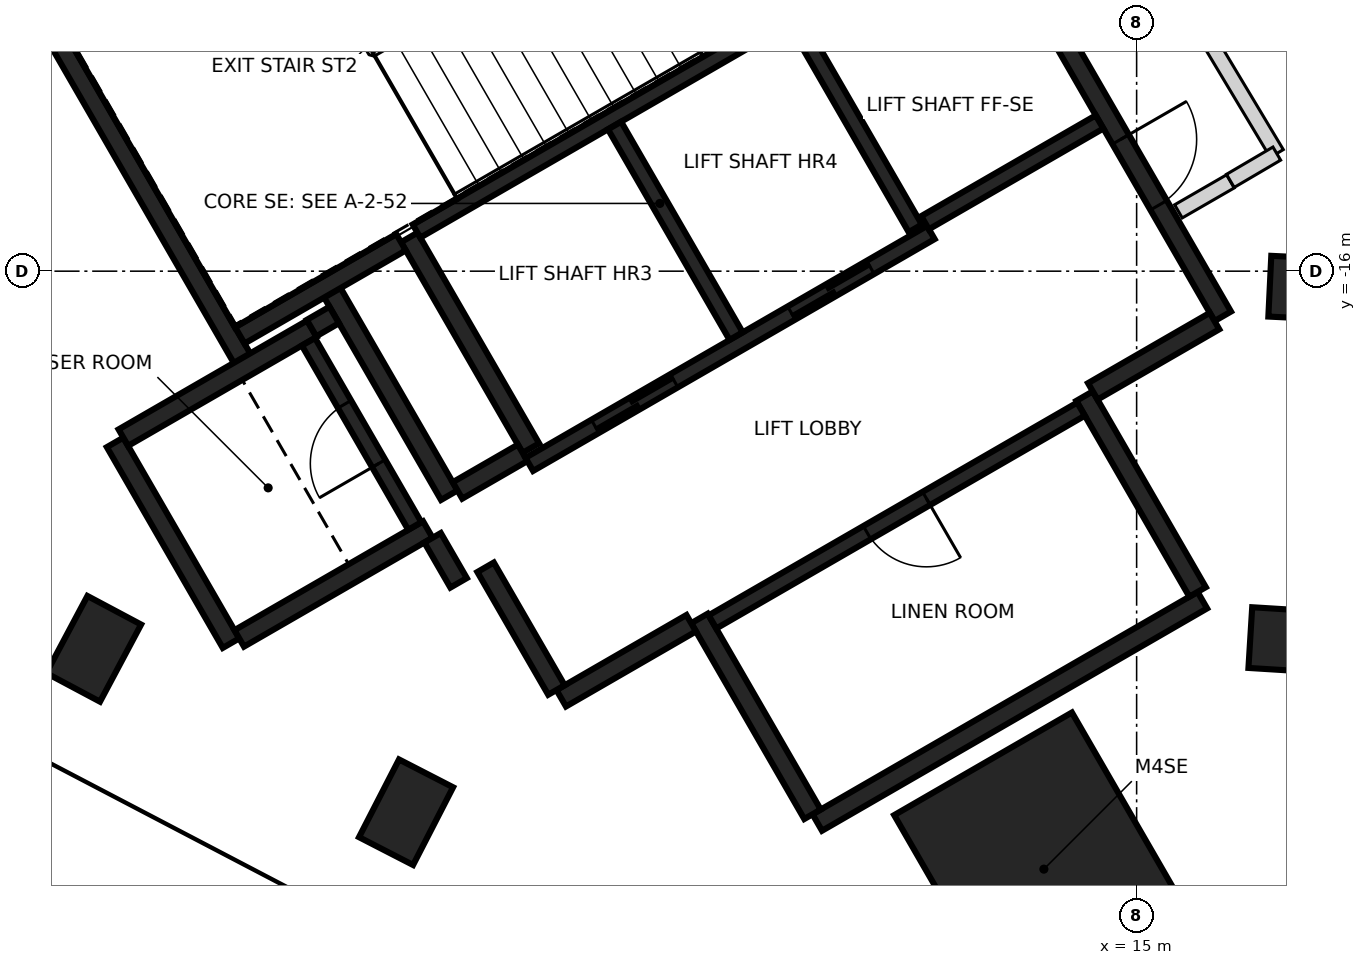
"""IFC4 building model, lengths in metres.
Left out: names, types, materials, properties, quantities, classifications, styles, units other than length and angle.
Written with IfcOpenShell. Run it as: python <this file> out.ifc"""

import sys

from ifc_helpers import new_model, si_unit, direction, frame, frame_2d, origin, origin_2d, place, context, subcontext, project, spatial, rectangle, extrude, element, fill, save


model = new_model("IFC4")
c1 = context("Model", 3, precision=1e-05, world=origin(), true_north=direction((0.0, 1.0)))
c2 = subcontext(c1, "Body", "Model", "MODEL_VIEW")
j1 = project(units=[si_unit("LENGTHUNIT", "METRE"), si_unit("PLANEANGLEUNIT", "RADIAN")], contexts=[c1])
p1 = place(None, origin())
s1 = spatial("IfcSite", under=j1, at=p1, CompositionType="ELEMENT")
p2 = place(p1, origin())
s2 = spatial("IfcBuilding", under=s1, at=p2, CompositionType="ELEMENT")
p3 = place(p2, frame((0.0, 0.0, 179.2)))
s3 = spatial("IfcBuildingStorey", under=s2, at=p3, CompositionType="ELEMENT", Elevation=179.2)
for number, where, z_axis, x_axis in (
    (1, (17.07, -20.856, -0.35), (0.0, 0.0, 1.0), (-0.998, 0.062, 0.0)),
    (2, (17.326, -16.226, -0.35), (0.0, 0.0, 1.0), (-0.999, 0.048, 0.0)),
    (3, (1.279, -20.968, -0.35), (0.0, 0.0, 1.0), (0.47, 0.883, 0.0)),
    (4, (5.388, -23.118, -0.35), (0.0, 0.0, 1.0), (0.458, 0.889, 0.0)),
):
    element("IfcColumn", number, at=place(p3, frame(where, z_axis=z_axis, x_axis=x_axis)), inside=s3, PredefinedType="COLUMN", context=c2, shape_type="SweptSolid", body=[
        extrude(rectangle(XDim=1.15, YDim=0.8, at=origin_2d()), origin(), (0.0, 0.0, 1.0), 3.6),
    ])
p4 = place(p3, frame((13.78, -23.867, -0.35), z_axis=(0.0, 0.0, 1.0), x_axis=(-0.5, 0.866025403784, 0.0)))
e5 = element("IfcColumn", 5, at=p4, inside=s3, PredefinedType="COLUMN", context=c2, shape_type="SweptSolid", body=[
    extrude(rectangle(XDim=3.2, YDim=2.7, at=origin_2d()), origin(), (0.0, 0.0, 1.0), 3.6),
])
p5 = place(p3, frame((13.008, -11.181, 0.0), z_axis=(0.0, 0.0, 1.0), x_axis=(0.500004234368, -0.866022959057, 0.0)))
e6 = element("IfcWall", 6, at=p5, inside=s3, PredefinedType="SHEAR", context=c2, shape_type="SweptSolid", body=[
    extrude(rectangle(XDim=6.25, YDim=0.25, at=frame_2d((3.125, 0.0))), origin(), (0.0, 0.0, 1.0), 3.25),
])
p6 = place(p5, frame((3.563, 0.0, 0.0)))
e7 = element("IfcOpeningElement", 7, at=p6, cuts=e6, PredefinedType="OPENING", context=c2, shape_type="SweptSolid", body=[
    extrude(rectangle(XDim=1.0, YDim=2.1, at=frame_2d((0.5, 1.05))), frame((0.0, 0.135, 0.0), z_axis=(0.0, -1.0, 0.0), x_axis=(1.0, 0.0, 0.0)), (0.0, 0.0, 1.0), 0.27),
])
p7 = place(p3, frame((15.865, -20.328, 0.0), z_axis=(0.0, 0.0, 1.0), x_axis=(-0.86602852612, -0.499994591916, 0.0)))
e8 = element("IfcWall", 8, at=p7, inside=s3, PredefinedType="SHEAR", context=c2, shape_type="SweptSolid", body=[
    extrude(rectangle(XDim=5.85, YDim=0.25, at=frame_2d((2.925, 0.0))), origin(), (0.0, 0.0, 1.0), 3.25),
])
p8 = place(p3, frame((3.235, -17.153, 0.0), z_axis=(0.0, 0.0, 1.0), x_axis=(-0.500008851346, 0.866020293397, 0.0)))
e9 = element("IfcWall", 9, at=p8, inside=s3, PredefinedType="SHEAR", context=c2, shape_type="SweptSolid", body=[
    extrude(rectangle(XDim=5.51, YDim=0.25, at=frame_2d((2.755, 0.0))), origin(), (0.0, 0.0, 1.0), 3.25),
])
p9 = place(p3, frame((7.031, -18.327, 0.0), z_axis=(0.0, 0.0, 1.0), x_axis=(-0.499971222258, 0.866042017984, 0.0)))
e10 = element("IfcWall", 10, at=p9, inside=s3, PredefinedType="SHEAR", context=c2, shape_type="SweptSolid", body=[
    extrude(rectangle(XDim=3.2, YDim=0.25, at=frame_2d((1.6, 0.0))), origin(), (0.0, 0.0, 1.0), 3.25),
])
for number, where, z_axis, x_axis in (
    (11, (14.315, -17.644, 0.0), (0.0, 0.0, 1.0), (0.5, -0.866, 0.0)),
    (12, (10.736, -23.145, 0.0), (0.0, 0.0, 1.0), (-0.5, 0.866, 0.0)),
):
    element("IfcWall", number, at=place(p3, frame(where, z_axis=z_axis, x_axis=x_axis)), inside=s3, PredefinedType="SHEAR", context=c2, shape_type="SweptSolid", body=[
        extrude(rectangle(XDim=2.974, YDim=0.25, at=frame_2d((1.487, 0.0))), origin(), (0.0, 0.0, 1.0), 3.25),
    ])
p10 = place(p3, frame((3.085, -20.894, 0.0), z_axis=(0.0, 0.0, 1.0), x_axis=(-0.499978833458, 0.866037623948, 0.0)))
e13 = element("IfcWall", 13, at=p10, inside=s3, PredefinedType="SHEAR", context=c2, shape_type="SweptSolid", body=[
    extrude(rectangle(XDim=3.05, YDim=0.25, at=frame_2d((1.525, 0.0))), origin(), (0.0, 0.0, 1.0), 3.25),
])
p11 = place(p3, frame((1.669, -18.19, 0.0), z_axis=(0.0, 0.0, 1.0), x_axis=(0.866042235819, 0.499970844928, 0.0)))
e14 = element("IfcWall", 14, at=p11, inside=s3, PredefinedType="SHEAR", context=c2, shape_type="SweptSolid", body=[
    extrude(rectangle(XDim=2.865, YDim=0.25, at=frame_2d((1.432, 0.0))), origin(), (0.0, 0.0, 1.0), 3.25),
])
p12 = place(p3, frame((5.675, -19.399, 0.0), z_axis=(0.0, 0.0, 1.0), x_axis=(-0.866026637627, -0.499997862916, 0.0)))
e15 = element("IfcWall", 15, at=p12, inside=s3, PredefinedType="SHEAR", context=c2, shape_type="SweptSolid", body=[
    extrude(rectangle(XDim=2.865, YDim=0.25, at=frame_2d((1.432, 0.0))), origin(), (0.0, 0.0, 1.0), 3.25),
])
p13 = place(p3, frame((4.414, -16.276, 0.0), z_axis=(0.0, 0.0, 1.0), x_axis=(0.500003324108, -0.866023484601, 0.0)))
e16 = element("IfcWall", 16, at=p13, inside=s3, PredefinedType="SHEAR", context=c2, shape_type="SweptSolid", body=[
    extrude(rectangle(XDim=3.085, YDim=0.25, at=frame_2d((1.542, 0.0))), origin(), (0.0, 0.0, 1.0), 3.25),
])
p14 = place(p3, frame((5.322, -15.619, 0.0), z_axis=(0.0, 0.0, 1.0), x_axis=(-0.866026229868, -0.499998569178, 0.0)))
e17 = element("IfcWall", 17, at=p14, inside=s3, PredefinedType="SHEAR", context=c2, shape_type="SweptSolid", body=[
    extrude(rectangle(XDim=2.449, YDim=0.25, at=frame_2d((1.225, 0.0))), origin(), (0.0, 0.0, 1.0), 3.25),
])
p15 = place(p3, frame((9.14, -20.631, 0.0), z_axis=(0.0, 0.0, 1.0), x_axis=(-0.866043531843, -0.499968599967, 0.0)))
e18 = element("IfcWall", 18, at=p15, inside=s3, PredefinedType="SHEAR", context=c2, shape_type="SweptSolid", body=[
    extrude(rectangle(XDim=1.975, YDim=0.25, at=frame_2d((0.987, 0.0))), origin(), (0.0, 0.0, 1.0), 3.25),
])
p16 = place(p3, frame((16.025, -16.656, 0.0), z_axis=(0.0, 0.0, 1.0), x_axis=(-0.866016279763, -0.500015802937, 0.0)))
e19 = element("IfcWall", 19, at=p16, inside=s3, PredefinedType="SHEAR", context=c2, shape_type="SweptSolid", body=[
    extrude(rectangle(XDim=1.849, YDim=0.25, at=frame_2d((0.925, 0.0))), origin(), (0.0, 0.0, 1.0), 3.25),
])
p17 = place(p3, frame((7.367, -21.51, 0.0), z_axis=(0.0, 0.0, 1.0), x_axis=(-0.499983108224, 0.866035156036, 0.0)))
e20 = element("IfcWall", 20, at=p17, inside=s3, PredefinedType="SHEAR", context=c2, shape_type="SweptSolid", body=[
    extrude(rectangle(XDim=1.865, YDim=0.25, at=frame_2d((0.932, 0.0))), origin(), (0.0, 0.0, 1.0), 3.25),
])
p18 = place(p3, frame((6.065, -18.885, 0.0), z_axis=(0.0, 0.0, 1.0), x_axis=(0.866017078145, 0.500014420154, 0.0)))
e21 = element("IfcWall", 21, at=p18, inside=s3, PredefinedType="SHEAR", context=c2, shape_type="SweptSolid", body=[
    extrude(rectangle(XDim=0.989, YDim=0.25, at=frame_2d((0.495, 0.0))), origin(), (0.0, 0.0, 1.0), 3.25),
])
p19 = place(p3, frame((6.08, -20.1, 0.0), z_axis=(0.0, 0.0, 1.0), x_axis=(-0.500051773299, 0.865995510393, 0.0)))
e22 = element("IfcWall", 22, at=p19, inside=s3, PredefinedType="SHEAR", context=c2, shape_type="SweptSolid", body=[
    extrude(rectangle(XDim=0.685, YDim=0.25, at=frame_2d((0.342, 0.0))), origin(), (0.0, 0.0, 1.0), 3.25),
])
p20 = place(p3, frame((4.145, -16.749, 0.0), z_axis=(0.0, 0.0, 1.0), x_axis=(0.866185586049, 0.49972245349, 0.0)))
e23 = element("IfcWall", 23, at=p20, inside=s3, PredefinedType="SHEAR", context=c2, shape_type="SweptSolid", body=[
    extrude(rectangle(XDim=0.344, YDim=0.25, at=frame_2d((0.172, 0.0))), origin(), (0.0, 0.0, 1.0), 3.25),
])
p21 = place(p3, frame((5.526, -15.472, 0.0), z_axis=(0.0, 0.0, 1.0), x_axis=(0.866041752167, 0.499971682701, 0.0)))
e24 = element("IfcWall", 24, at=p21, inside=s3, PredefinedType="SHEAR", context=c2, shape_type="SweptSolid", body=[
    extrude(rectangle(XDim=5.851, YDim=0.2, at=frame_2d((2.925, 0.0))), origin(), (0.0, 0.0, 1.0), 3.25),
])
p22 = place(p3, frame((7.01, -18.542, 0.0), z_axis=(0.0, 0.0, 1.0), x_axis=(0.866030299012, 0.499991521122, 0.0)))
e25 = element("IfcWall", 25, at=p22, inside=s3, PredefinedType="SHEAR", context=c2, shape_type="SweptSolid", body=[
    extrude(rectangle(XDim=6.1, YDim=0.2, at=frame_2d((3.05, 0.0))), origin(), (0.0, 0.0, 1.0), 3.25),
])
p23 = place(p22, frame((1.0, 0.0, 0.0)))
e26 = element("IfcOpeningElement", 26, at=p23, cuts=e25, PredefinedType="OPENING", context=c2, shape_type="SweptSolid", body=[
    extrude(rectangle(XDim=1.2, YDim=2.1, at=frame_2d((0.6, 1.05))), frame((0.0, 0.11, 0.0), z_axis=(0.0, -1.0, 0.0), x_axis=(1.0, 0.0, 0.0)), (0.0, 0.0, 1.0), 0.22),
])
p24 = place(p22, frame((3.982, 0.0, 0.0)))
e27 = element("IfcOpeningElement", 27, at=p24, cuts=e25, PredefinedType="OPENING", context=c2, shape_type="SweptSolid", body=[
    extrude(rectangle(XDim=1.2, YDim=2.1, at=frame_2d((0.6, 1.05))), frame((0.0, 0.11, 0.0), z_axis=(0.0, -1.0, 0.0), x_axis=(1.0, 0.0, 0.0)), (0.0, 0.0, 1.0), 0.22),
])
p25 = place(p3, frame((14.268, -17.815, 0.0), z_axis=(0.0, 0.0, 1.0), x_axis=(-0.866033794273, -0.499985466966, 0.0)))
e28 = element("IfcWall", 28, at=p25, inside=s3, PredefinedType="SHEAR", context=c2, shape_type="SweptSolid", body=[
    extrude(rectangle(XDim=5.598, YDim=0.2, at=frame_2d((2.799, 0.0))), origin(), (0.0, 0.0, 1.0), 3.25),
])
p26 = place(p25, frame((2.349, 0.0, 0.0)))
e29 = element("IfcOpeningElement", 29, at=p26, cuts=e28, PredefinedType="OPENING", context=c2, shape_type="SweptSolid", body=[
    extrude(rectangle(XDim=0.9, YDim=2.1, at=frame_2d((0.45, 1.05))), frame((0.0, 0.11, 0.0), z_axis=(0.0, -1.0, 0.0), x_axis=(1.0, 0.0, 0.0)), (0.0, 0.0, 1.0), 0.22),
])
p27 = place(p3, frame((8.132, -14.084, 0.0), z_axis=(0.0, 0.0, 1.0), x_axis=(0.499997778408, -0.866026686418, 0.0)))
e30 = element("IfcWall", 30, at=p27, inside=s3, PredefinedType="SHEAR", context=c2, shape_type="SweptSolid", body=[
    extrude(rectangle(XDim=3.198, YDim=0.2, at=frame_2d((1.599, 0.0))), origin(), (0.0, 0.0, 1.0), 3.25),
])
p28 = place(p3, frame((5.503, -19.352, 0.0), z_axis=(0.0, 0.0, 1.0), x_axis=(-0.499986818241, 0.866033014143, 0.0)))
e31 = element("IfcWall", 31, at=p28, inside=s3, PredefinedType="SHEAR", context=c2, shape_type="SweptSolid", body=[
    extrude(rectangle(XDim=2.798, YDim=0.2, at=frame_2d((1.399, 0.0))), origin(), (0.0, 0.0, 1.0), 3.25),
])
p29 = place(p28, frame((0.949, 0.0, 0.0)))
e32 = element("IfcOpeningElement", 32, at=p29, cuts=e31, PredefinedType="OPENING", context=c2, shape_type="SweptSolid", body=[
    extrude(rectangle(XDim=0.9, YDim=2.1, at=frame_2d((0.45, 1.05))), frame((0.0, 0.11, 0.0), z_axis=(0.0, -1.0, 0.0), x_axis=(1.0, 0.0, 0.0)), (0.0, 0.0, 1.0), 0.22),
])
p30 = place(p3, frame((12.088, -15.437, 0.0), z_axis=(0.0, 0.0, 1.0), x_axis=(-0.500026960575, 0.86600983753, 0.0)))
e33 = element("IfcWall", 33, at=p30, inside=s3, PredefinedType="SHEAR", context=c2, shape_type="SweptSolid", body=[
    extrude(rectangle(XDim=3.1, YDim=0.2, at=frame_2d((1.55, 0.0))), origin(), (0.0, 0.0, 1.0), 3.25),
])
p31 = place(p3, frame((14.512, -14.037, 0.0), z_axis=(0.0, 0.0, 1.0), x_axis=(-0.866018407898, -0.500012117035, 0.0)))
e34 = element("IfcWall", 34, at=p31, inside=s3, PredefinedType="SHEAR", context=c2, shape_type="SweptSolid", body=[
    extrude(rectangle(XDim=2.651, YDim=0.2, at=frame_2d((1.325, 0.0))), origin(), (0.0, 0.0, 1.0), 3.25),
])
p32 = place(p3, frame((11.216, -5.058, 0.0), z_axis=(0.0, 0.0, 1.0), x_axis=(0.51393500197, -0.857829128527, 0.0)))
e35 = element("IfcWall", 35, at=p32, inside=s3, PredefinedType="PARTITIONING", context=c2, shape_type="SweptSolid", body=[
    extrude(rectangle(XDim=10.951, YDim=0.2, at=frame_2d((5.475, 0.0))), origin(), (0.0, 0.0, 1.0), 3.25),
])
p33 = place(p32, frame((4.438, 0.0, 0.0)))
e36 = element("IfcOpeningElement", 36, at=p33, cuts=e35, PredefinedType="OPENING", context=c2, shape_type="SweptSolid", body=[
    extrude(rectangle(XDim=0.95, YDim=2.1, at=frame_2d((0.475, 1.05))), frame((0.0, 0.11, 0.0), z_axis=(0.0, -1.0, 0.0), x_axis=(1.0, 0.0, 0.0)), (0.0, 0.0, 1.0), 0.22),
])
p34 = place(p3, frame((15.55, -15.213, 0.0), z_axis=(0.0, 0.0, 1.0), x_axis=(0.865989998118, 0.500061319399, 0.0)))
e37 = element("IfcWall", 37, at=p34, inside=s3, PredefinedType="PARTITIONING", context=c2, shape_type="SweptSolid", body=[
    extrude(rectangle(XDim=0.79, YDim=0.2, at=frame_2d((0.395, 0.0))), origin(), (0.0, 0.0, 1.0), 3.25),
])
p35 = place(p3, frame((16.233, -14.812, 0.0), z_axis=(0.0, 0.0, 1.0), x_axis=(0.862137800155, 0.506673872964, 0.0)))
e38 = element("IfcWall", 38, at=p35, inside=s3, PredefinedType="PARTITIONING", context=c2, shape_type="SweptSolid", body=[
    extrude(rectangle(XDim=0.709, YDim=0.2, at=frame_2d((0.354, 0.0))), origin(), (0.0, 0.0, 1.0), 3.25),
])
p36 = place(p23, origin())
e39 = element("IfcDoor", 39, at=p36, inside=s3, OperationType="DOUBLE_DOOR_SLIDING", PredefinedType="DOOR", context=c2, shape_type="SweptSolid", body=[
    extrude(rectangle(XDim=1.2, YDim=2.1, at=frame_2d((0.6, 1.05))), frame((0.0, 0.025, 0.0), z_axis=(0.0, -1.0, 0.0), x_axis=(1.0, 0.0, 0.0)), (0.0, 0.0, 1.0), 0.05),
])
fill(e26, e39)
p37 = place(p24, origin())
e40 = element("IfcDoor", 40, at=p37, inside=s3, OperationType="DOUBLE_DOOR_SLIDING", PredefinedType="DOOR", context=c2, shape_type="SweptSolid", body=[
    extrude(rectangle(XDim=1.2, YDim=2.1, at=frame_2d((0.6, 1.05))), frame((0.0, 0.025, 0.0), z_axis=(0.0, -1.0, 0.0), x_axis=(1.0, 0.0, 0.0)), (0.0, 0.0, 1.0), 0.05),
])
fill(e27, e40)
p38 = place(p6, origin())
e41 = element("IfcDoor", 41, at=p38, inside=s3, OperationType="SINGLE_SWING_LEFT", PredefinedType="DOOR", context=c2, shape_type="SweptSolid", body=[
    extrude(rectangle(XDim=1.0, YDim=2.1, at=frame_2d((0.5, 1.05))), frame((0.0, 0.025, 0.0), z_axis=(0.0, -1.0, 0.0), x_axis=(1.0, 0.0, 0.0)), (0.0, 0.0, 1.0), 0.05),
])
fill(e7, e41)
p39 = place(p26, origin())
e42 = element("IfcDoor", 42, at=p39, inside=s3, OperationType="SINGLE_SWING_LEFT", PredefinedType="DOOR", context=c2, shape_type="SweptSolid", body=[
    extrude(rectangle(XDim=0.9, YDim=2.1, at=frame_2d((0.45, 1.05))), frame((0.0, 0.025, 0.0), z_axis=(0.0, -1.0, 0.0), x_axis=(1.0, 0.0, 0.0)), (0.0, 0.0, 1.0), 0.05),
])
fill(e29, e42)
p40 = place(p29, origin())
e43 = element("IfcDoor", 43, at=p40, inside=s3, OperationType="SINGLE_SWING_RIGHT", PredefinedType="DOOR", context=c2, shape_type="SweptSolid", body=[
    extrude(rectangle(XDim=0.9, YDim=2.1, at=frame_2d((0.45, 1.05))), frame((0.0, 0.025, 0.0), z_axis=(0.0, -1.0, 0.0), x_axis=(1.0, 0.0, 0.0)), (0.0, 0.0, 1.0), 0.05),
])
fill(e32, e43)
save(model, sys.argv[1])
